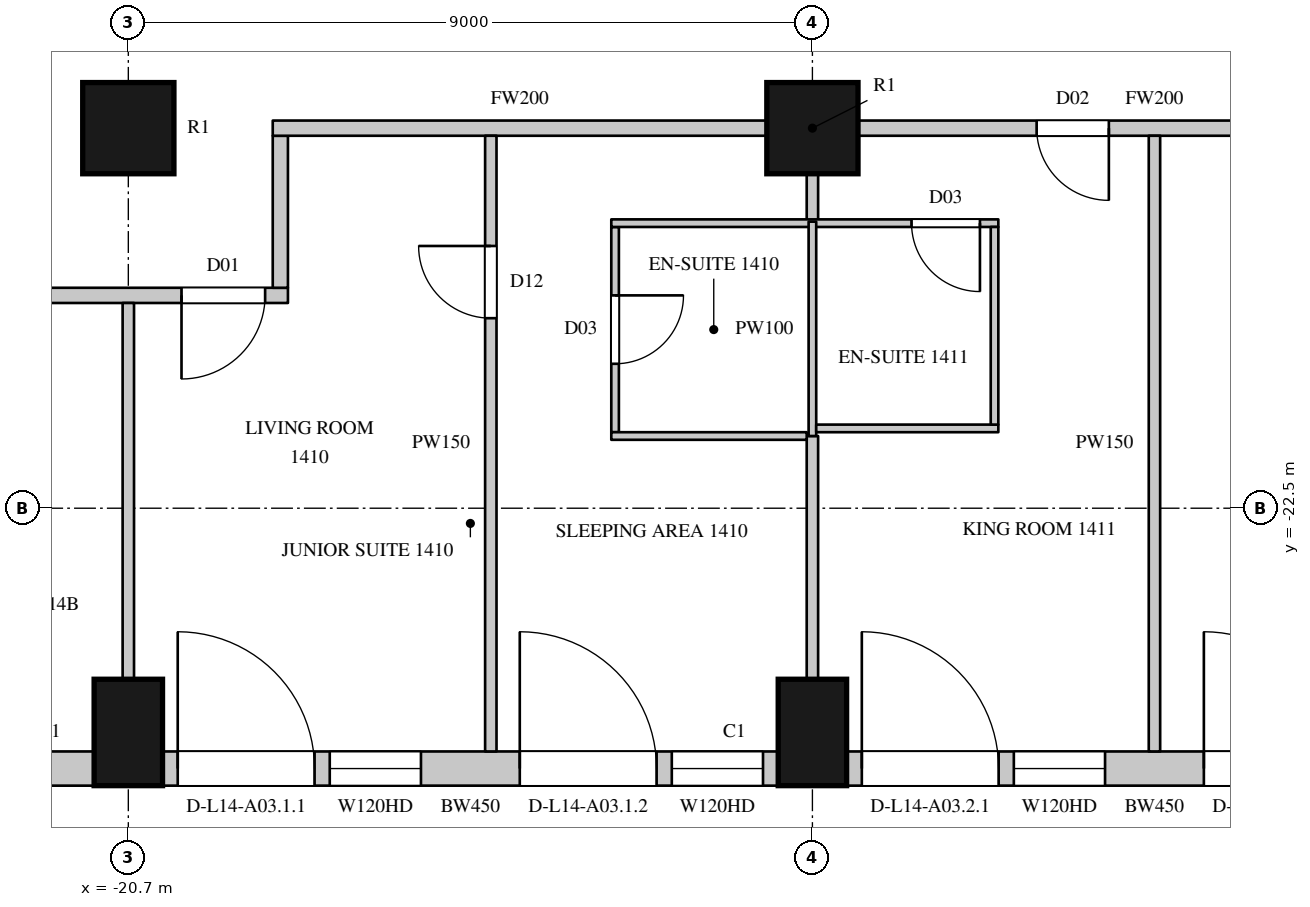
"""IFC4 building model, lengths in metres.
Left out: names, types, materials, properties, quantities, classifications, styles, units other than length and angle.
Written with IfcOpenShell. Run it as: python <this file> out.ifc"""

import sys

from ifc_helpers import new_model, si_unit, direction, frame, frame_2d, origin, origin_2d, place, context, subcontext, project, spatial, rectangle, circle, extrude, element, fill, save


model = new_model("IFC4")
c1 = context("Model", 3, precision=1e-05, world=origin(), true_north=direction((0.0, 1.0)))
c2 = subcontext(c1, "Body", "Model", "MODEL_VIEW")
j1 = project(units=[si_unit("LENGTHUNIT", "METRE"), si_unit("PLANEANGLEUNIT", "RADIAN")], contexts=[c1])
p1 = place(None, origin())
s1 = spatial("IfcSite", under=j1, at=p1, CompositionType="ELEMENT")
p2 = place(p1, origin())
s2 = spatial("IfcBuilding", under=s1, at=p2, CompositionType="ELEMENT")
p3 = place(p2, frame((0.0, 0.0, 80.7)))
s3 = spatial("IfcBuildingStorey", under=s2, at=p3, CompositionType="ELEMENT", Elevation=80.7)
for number, where, z_axis, x_axis in (
    (1, (-20.7, -25.45, 0.0), (0.0, 0.0, 1.0), (1.0, 0.0, 0.0)),
    (2, (-11.7, -25.45, 0.0), (0.0, 0.0, 1.0), (1.0, 0.0, 0.0)),
):
    element("IfcColumn", number, at=place(p3, frame(where, z_axis=z_axis, x_axis=x_axis)), inside=s3, PredefinedType="COLUMN", context=c2, shape_type="SweptSolid", body=[
        extrude(rectangle(XDim=0.9, YDim=1.4, at=origin_2d()), origin(), (0.0, 0.0, 1.0), 3.6),
    ])
for number, where, z_axis, x_axis in (
    (3, (-20.7, -17.5, 0.0), (0.0, 0.0, 1.0), (1.0, 0.0, 0.0)),
    (4, (-11.7, -17.5, 0.0), (0.0, 0.0, 1.0), (1.0, 0.0, 0.0)),
):
    element("IfcColumn", number, at=place(p3, frame(where, z_axis=z_axis, x_axis=x_axis)), inside=s3, PredefinedType="COLUMN", context=c2, shape_type="SweptSolid", body=[
        extrude(circle(Radius=0.6, at=origin_2d()), origin(), (0.0, 0.0, 1.0), 3.6),
    ])
p4 = place(p3, frame((-24.064, -25.925, 0.0), z_axis=(0.0, 0.0, 1.0), x_axis=(1.0, 0.0, 0.0)))
e5 = element("IfcWall", 5, at=p4, inside=s3, PredefinedType="SOLIDWALL", context=c2, shape_type="SweptSolid", body=[
    extrude(rectangle(XDim=2.914, YDim=0.45, at=frame_2d((1.457, 0.0))), origin(), (0.0, 0.0, 1.0), 3.3),
])
p5 = place(p3, frame((-20.25, -25.925, 0.0), z_axis=(0.0, 0.0, 1.0), x_axis=(1.0, 0.0, 0.0)))
e6 = element("IfcWall", 6, at=p5, inside=s3, PredefinedType="SOLIDWALL", context=c2, shape_type="SweptSolid", body=[
    extrude(rectangle(XDim=8.1, YDim=0.45, at=frame_2d((4.05, 0.0))), origin(), (0.0, 0.0, 1.0), 3.3),
])
p6 = place(p5, frame((0.2, 0.0, 0.0)))
e7 = element("IfcOpeningElement", 7, at=p6, cuts=e6, PredefinedType="OPENING", context=c2, shape_type="SweptSolid", body=[
    extrude(rectangle(XDim=1.8, YDim=2.4, at=frame_2d((0.9, 1.2))), frame((0.0, 0.235, 0.0), z_axis=(0.0, -1.0, 0.0), x_axis=(1.0, 0.0, 0.0)), (0.0, 0.0, 1.0), 0.47),
])
p7 = place(p5, frame((2.2, 0.0, 1.05)))
e8 = element("IfcOpeningElement", 8, at=p7, cuts=e6, PredefinedType="OPENING", context=c2, shape_type="SweptSolid", body=[
    extrude(rectangle(XDim=1.2, YDim=2.0, at=frame_2d((0.6, 1.0))), frame((0.0, 0.235, 0.0), z_axis=(0.0, -1.0, 0.0), x_axis=(1.0, 0.0, 0.0)), (0.0, 0.0, 1.0), 0.47),
])
p8 = place(p5, frame((4.7, 0.0, 0.0)))
e9 = element("IfcOpeningElement", 9, at=p8, cuts=e6, PredefinedType="OPENING", context=c2, shape_type="SweptSolid", body=[
    extrude(rectangle(XDim=1.8, YDim=2.4, at=frame_2d((0.9, 1.2))), frame((0.0, 0.235, 0.0), z_axis=(0.0, -1.0, 0.0), x_axis=(1.0, 0.0, 0.0)), (0.0, 0.0, 1.0), 0.47),
])
p9 = place(p5, frame((6.7, 0.0, 1.05)))
e10 = element("IfcOpeningElement", 10, at=p9, cuts=e6, PredefinedType="OPENING", context=c2, shape_type="SweptSolid", body=[
    extrude(rectangle(XDim=1.2, YDim=2.0, at=frame_2d((0.6, 1.0))), frame((0.0, 0.235, 0.0), z_axis=(0.0, -1.0, 0.0), x_axis=(1.0, 0.0, 0.0)), (0.0, 0.0, 1.0), 0.47),
])
p10 = place(p3, frame((-11.25, -25.925, 0.0), z_axis=(0.0, 0.0, 1.0), x_axis=(1.0, 0.0, 0.0)))
e11 = element("IfcWall", 11, at=p10, inside=s3, PredefinedType="SOLIDWALL", context=c2, shape_type="SweptSolid", body=[
    extrude(rectangle(XDim=8.1, YDim=0.45, at=frame_2d((4.05, 0.0))), origin(), (0.0, 0.0, 1.0), 3.3),
])
p11 = place(p10, frame((0.2, 0.0, 0.0)))
e12 = element("IfcOpeningElement", 12, at=p11, cuts=e11, PredefinedType="OPENING", context=c2, shape_type="SweptSolid", body=[
    extrude(rectangle(XDim=1.8, YDim=2.4, at=frame_2d((0.9, 1.2))), frame((0.0, 0.235, 0.0), z_axis=(0.0, -1.0, 0.0), x_axis=(1.0, 0.0, 0.0)), (0.0, 0.0, 1.0), 0.47),
])
p12 = place(p10, frame((2.2, 0.0, 1.05)))
e13 = element("IfcOpeningElement", 13, at=p12, cuts=e11, PredefinedType="OPENING", context=c2, shape_type="SweptSolid", body=[
    extrude(rectangle(XDim=1.2, YDim=2.0, at=frame_2d((0.6, 1.0))), frame((0.0, 0.235, 0.0), z_axis=(0.0, -1.0, 0.0), x_axis=(1.0, 0.0, 0.0)), (0.0, 0.0, 1.0), 0.47),
])
p13 = place(p10, frame((4.7, 0.0, 0.0)))
e14 = element("IfcOpeningElement", 14, at=p13, cuts=e11, PredefinedType="OPENING", context=c2, shape_type="SweptSolid", body=[
    extrude(rectangle(XDim=1.8, YDim=2.4, at=frame_2d((0.9, 1.2))), frame((0.0, 0.235, 0.0), z_axis=(0.0, -1.0, 0.0), x_axis=(1.0, 0.0, 0.0)), (0.0, 0.0, 1.0), 0.47),
])
p14 = place(p10, frame((6.7, 0.0, 1.05)))
e15 = element("IfcOpeningElement", 15, at=p14, cuts=e11, PredefinedType="OPENING", context=c2, shape_type="SweptSolid", body=[
    extrude(rectangle(XDim=1.2, YDim=2.0, at=frame_2d((0.6, 1.0))), frame((0.0, 0.235, 0.0), z_axis=(0.0, -1.0, 0.0), x_axis=(1.0, 0.0, 0.0)), (0.0, 0.0, 1.0), 0.47),
])
p15 = place(p3, frame((-23.7, -19.7, 0.0), z_axis=(0.0, 0.0, 1.0), x_axis=(1.0, 0.0, 0.0)))
e16 = element("IfcWall", 16, at=p15, inside=s3, PredefinedType="PARTITIONING", context=c2, shape_type="SweptSolid", body=[
    extrude(rectangle(XDim=5.1, YDim=0.2, at=frame_2d((2.55, 0.0))), origin(), (0.0, 0.0, 1.0), 3.3),
])
p16 = place(p15, frame((0.8, 0.0, 0.0)))
e17 = element("IfcOpeningElement", 17, at=p16, cuts=e16, PredefinedType="OPENING", context=c2, shape_type="SweptSolid", body=[
    extrude(rectangle(XDim=0.9, YDim=2.2, at=frame_2d((0.45, 1.1))), frame((0.0, 0.11, 0.0), z_axis=(0.0, -1.0, 0.0), x_axis=(1.0, 0.0, 0.0)), (0.0, 0.0, 1.0), 0.22),
])
p17 = place(p15, frame((3.7, 0.0, 0.0)))
e18 = element("IfcOpeningElement", 18, at=p17, cuts=e16, PredefinedType="OPENING", context=c2, shape_type="SweptSolid", body=[
    extrude(rectangle(XDim=1.1, YDim=2.4, at=frame_2d((0.55, 1.2))), frame((0.0, 0.11, 0.0), z_axis=(0.0, -1.0, 0.0), x_axis=(1.0, 0.0, 0.0)), (0.0, 0.0, 1.0), 0.22),
])
p18 = place(p3, frame((-18.7, -19.6, 0.0), z_axis=(0.0, 0.0, 1.0), x_axis=(0.0, 1.0, 0.0)))
e19 = element("IfcWall", 19, at=p18, inside=s3, PredefinedType="PARTITIONING", context=c2, shape_type="SweptSolid", body=[
    extrude(rectangle(XDim=2.0, YDim=0.2, at=frame_2d((1.0, 0.0))), origin(), (0.0, 0.0, 1.0), 3.3),
])
p19 = place(p3, frame((-18.8, -17.5, 0.0), z_axis=(0.0, 0.0, 1.0), x_axis=(1.0, 0.0, 0.0)))
e20 = element("IfcWall", 20, at=p19, inside=s3, PredefinedType="PARTITIONING", context=c2, shape_type="SweptSolid", body=[
    extrude(rectangle(XDim=6.5, YDim=0.2, at=frame_2d((3.25, 0.0))), origin(), (0.0, 0.0, 1.0), 2.75),
])
p20 = place(p3, frame((-11.1, -17.5, 0.0), z_axis=(0.0, 0.0, 1.0), x_axis=(1.0, 0.0, 0.0)))
e21 = element("IfcWall", 21, at=p20, inside=s3, PredefinedType="PARTITIONING", context=c2, shape_type="SweptSolid", body=[
    extrude(rectangle(XDim=7.8, YDim=0.2, at=frame_2d((3.9, 0.0))), origin(), (0.0, 0.0, 1.0), 2.75),
])
p21 = place(p20, frame((2.35, 0.0, 0.0)))
e22 = element("IfcOpeningElement", 22, at=p21, cuts=e21, PredefinedType="OPENING", context=c2, shape_type="SweptSolid", body=[
    extrude(rectangle(XDim=0.95, YDim=2.2, at=frame_2d((0.475, 1.1))), frame((0.0, 0.11, 0.0), z_axis=(0.0, -1.0, 0.0), x_axis=(1.0, 0.0, 0.0)), (0.0, 0.0, 1.0), 0.22),
])
p22 = place(p20, frame((5.15, 0.0, 0.0)))
e23 = element("IfcOpeningElement", 23, at=p22, cuts=e21, PredefinedType="OPENING", context=c2, shape_type="SweptSolid", body=[
    extrude(rectangle(XDim=1.1, YDim=2.4, at=frame_2d((0.55, 1.2))), frame((0.0, 0.11, 0.0), z_axis=(0.0, -1.0, 0.0), x_axis=(1.0, 0.0, 0.0)), (0.0, 0.0, 1.0), 0.22),
])
p23 = place(p3, frame((-20.7, -24.75, 0.0), z_axis=(0.0, 0.0, 1.0), x_axis=(0.0, 1.0, 0.0)))
e24 = element("IfcWall", 24, at=p23, inside=s3, PredefinedType="PARTITIONING", context=c2, shape_type="SweptSolid", body=[
    extrude(rectangle(XDim=4.95, YDim=0.15, at=frame_2d((2.475, 0.0))), origin(), (0.0, 0.0, 1.0), 2.75),
])
p24 = place(p3, frame((-15.931, -25.7, 0.0), z_axis=(0.0, 0.0, 1.0), x_axis=(0.0, 1.0, 0.0)))
e25 = element("IfcWall", 25, at=p24, inside=s3, PredefinedType="PARTITIONING", context=c2, shape_type="SweptSolid", body=[
    extrude(rectangle(XDim=8.1, YDim=0.15, at=frame_2d((4.05, 0.0))), origin(), (0.0, 0.0, 1.0), 3.3),
])
p25 = place(p24, frame((5.7, 0.0, 0.0)))
e26 = element("IfcOpeningElement", 26, at=p25, cuts=e25, PredefinedType="OPENING", context=c2, shape_type="SweptSolid", body=[
    extrude(rectangle(XDim=0.95, YDim=2.2, at=frame_2d((0.475, 1.1))), frame((0.0, 0.085, 0.0), z_axis=(0.0, -1.0, 0.0), x_axis=(1.0, 0.0, 0.0)), (0.0, 0.0, 1.0), 0.17),
])
p26 = place(p3, frame((-11.7, -24.75, 0.0), z_axis=(0.0, 0.0, 1.0), x_axis=(0.0, 1.0, 0.0)))
e27 = element("IfcWall", 27, at=p26, inside=s3, PredefinedType="PARTITIONING", context=c2, shape_type="SweptSolid", body=[
    extrude(rectangle(XDim=3.2, YDim=0.15, at=frame_2d((1.6, 0.0))), origin(), (0.0, 0.0, 1.0), 2.75),
])
p27 = place(p3, frame((-11.7, -18.73, 0.0), z_axis=(0.0, 0.0, 1.0), x_axis=(0.0, 1.0, 0.0)))
e28 = element("IfcWall", 28, at=p27, inside=s3, PredefinedType="PARTITIONING", context=c2, shape_type="SweptSolid", body=[
    extrude(rectangle(XDim=0.63, YDim=0.15, at=frame_2d((0.315, 0.0))), origin(), (0.0, 0.0, 1.0), 2.75),
])
p28 = place(p3, frame((-7.2, -25.7, 0.0), z_axis=(0.0, 0.0, 1.0), x_axis=(0.0, 1.0, 0.0)))
e29 = element("IfcWall", 29, at=p28, inside=s3, PredefinedType="PARTITIONING", context=c2, shape_type="SweptSolid", body=[
    extrude(rectangle(XDim=8.1, YDim=0.15, at=frame_2d((4.05, 0.0))), origin(), (0.0, 0.0, 1.0), 2.65),
])
p29 = place(p3, frame((-14.296, -21.5, 0.0), z_axis=(0.0, 0.0, 1.0), x_axis=(0.0, 1.0, 0.0)))
e30 = element("IfcWall", 30, at=p29, inside=s3, PredefinedType="PARTITIONING", context=c2, shape_type="SweptSolid", body=[
    extrude(rectangle(XDim=2.7, YDim=0.1, at=frame_2d((1.35, 0.0))), origin(), (0.0, 0.0, 1.0), 3.3),
])
p30 = place(p29, frame((0.9, 0.0, 0.0)))
e31 = element("IfcOpeningElement", 31, at=p30, cuts=e30, PredefinedType="OPENING", context=c2, shape_type="SweptSolid", body=[
    extrude(rectangle(XDim=0.9, YDim=2.2, at=frame_2d((0.45, 1.1))), frame((0.0, 0.06, 0.0), z_axis=(0.0, -1.0, 0.0), x_axis=(1.0, 0.0, 0.0)), (0.0, 0.0, 1.0), 0.12),
])
p31 = place(p3, frame((-14.346, -21.55, 0.0), z_axis=(0.0, 0.0, 1.0), x_axis=(1.0, 0.0, 0.0)))
e32 = element("IfcWall", 32, at=p31, inside=s3, PredefinedType="PARTITIONING", context=c2, shape_type="SweptSolid", body=[
    extrude(rectangle(XDim=2.571, YDim=0.1, at=frame_2d((1.286, 0.0))), origin(), (0.0, 0.0, 1.0), 3.3),
])
p32 = place(p3, frame((-14.346, -18.75, 0.0), z_axis=(0.0, 0.0, 1.0), x_axis=(1.0, 0.0, 0.0)))
e33 = element("IfcWall", 33, at=p32, inside=s3, PredefinedType="PARTITIONING", context=c2, shape_type="SweptSolid", body=[
    extrude(rectangle(XDim=5.092, YDim=0.1, at=frame_2d((2.546, 0.0))), origin(), (0.0, 0.0, 1.0), 3.3),
])
p33 = place(p32, frame((3.95, 0.0, 0.0)))
e34 = element("IfcOpeningElement", 34, at=p33, cuts=e33, PredefinedType="OPENING", context=c2, shape_type="SweptSolid", body=[
    extrude(rectangle(XDim=0.9, YDim=2.2, at=frame_2d((0.45, 1.1))), frame((0.0, 0.06, 0.0), z_axis=(0.0, -1.0, 0.0), x_axis=(1.0, 0.0, 0.0)), (0.0, 0.0, 1.0), 0.12),
])
p34 = place(p3, frame((-11.7, -21.55, 0.0), z_axis=(0.0, 0.0, 1.0), x_axis=(0.0, 1.0, 0.0)))
e35 = element("IfcWall", 35, at=p34, inside=s3, PredefinedType="PARTITIONING", context=c2, shape_type="SweptSolid", body=[
    extrude(rectangle(XDim=2.82, YDim=0.1, at=frame_2d((1.41, 0.0))), origin(), (0.0, 0.0, 1.0), 2.75),
])
p35 = place(p3, frame((-11.65, -21.45, 0.0), z_axis=(0.0, 0.0, 1.0), x_axis=(1.0, 0.0, 0.0)))
e36 = element("IfcWall", 36, at=p35, inside=s3, PredefinedType="PARTITIONING", context=c2, shape_type="SweptSolid", body=[
    extrude(rectangle(XDim=2.396, YDim=0.1, at=frame_2d((1.198, 0.0))), origin(), (0.0, 0.0, 1.0), 3.3),
])
p36 = place(p3, frame((-9.304, -21.4, 0.0), z_axis=(0.0, 0.0, 1.0), x_axis=(0.0, 1.0, 0.0)))
e37 = element("IfcWall", 37, at=p36, inside=s3, PredefinedType="PARTITIONING", context=c2, shape_type="SweptSolid", body=[
    extrude(rectangle(XDim=2.6, YDim=0.1, at=frame_2d((1.3, 0.0))), origin(), (0.0, 0.0, 1.0), 3.3),
])
p37 = place(p6, origin())
e38 = element("IfcDoor", 38, at=p37, inside=s3, OperationType="SLIDING_TO_LEFT", PredefinedType="DOOR", context=c2, shape_type="SweptSolid", body=[
    extrude(rectangle(XDim=1.8, YDim=2.4, at=frame_2d((0.9, 1.2))), frame((0.0, 0.13, 0.0), z_axis=(0.0, -1.0, 0.0), x_axis=(1.0, 0.0, 0.0)), (0.0, 0.0, 1.0), 0.05),
])
fill(e7, e38)
p38 = place(p7, origin())
e39 = element("IfcWindow", 39, at=p38, inside=s3, PartitioningType="SINGLE_PANEL", PredefinedType="WINDOW", context=c2, shape_type="SweptSolid", body=[
    extrude(rectangle(XDim=1.2, YDim=2.0, at=frame_2d((0.6, 1.0))), frame((0.0, 0.135, 0.0), z_axis=(0.0, -1.0, 0.0), x_axis=(1.0, 0.0, 0.0)), (0.0, 0.0, 1.0), 0.06),
])
fill(e8, e39)
p39 = place(p8, origin())
e40 = element("IfcDoor", 40, at=p39, inside=s3, OperationType="SLIDING_TO_LEFT", PredefinedType="DOOR", context=c2, shape_type="SweptSolid", body=[
    extrude(rectangle(XDim=1.8, YDim=2.4, at=frame_2d((0.9, 1.2))), frame((0.0, 0.13, 0.0), z_axis=(0.0, -1.0, 0.0), x_axis=(1.0, 0.0, 0.0)), (0.0, 0.0, 1.0), 0.05),
])
fill(e9, e40)
p40 = place(p9, origin())
e41 = element("IfcWindow", 41, at=p40, inside=s3, PartitioningType="SINGLE_PANEL", PredefinedType="WINDOW", context=c2, shape_type="SweptSolid", body=[
    extrude(rectangle(XDim=1.2, YDim=2.0, at=frame_2d((0.6, 1.0))), frame((0.0, 0.135, 0.0), z_axis=(0.0, -1.0, 0.0), x_axis=(1.0, 0.0, 0.0)), (0.0, 0.0, 1.0), 0.06),
])
fill(e10, e41)
p41 = place(p11, origin())
e42 = element("IfcDoor", 42, at=p41, inside=s3, OperationType="SLIDING_TO_LEFT", PredefinedType="DOOR", context=c2, shape_type="SweptSolid", body=[
    extrude(rectangle(XDim=1.8, YDim=2.4, at=frame_2d((0.9, 1.2))), frame((0.0, 0.13, 0.0), z_axis=(0.0, -1.0, 0.0), x_axis=(1.0, 0.0, 0.0)), (0.0, 0.0, 1.0), 0.05),
])
fill(e12, e42)
p42 = place(p12, origin())
e43 = element("IfcWindow", 43, at=p42, inside=s3, PartitioningType="SINGLE_PANEL", PredefinedType="WINDOW", context=c2, shape_type="SweptSolid", body=[
    extrude(rectangle(XDim=1.2, YDim=2.0, at=frame_2d((0.6, 1.0))), frame((0.0, 0.135, 0.0), z_axis=(0.0, -1.0, 0.0), x_axis=(1.0, 0.0, 0.0)), (0.0, 0.0, 1.0), 0.06),
])
fill(e13, e43)
p43 = place(p13, origin())
e44 = element("IfcDoor", 44, at=p43, inside=s3, OperationType="SLIDING_TO_LEFT", PredefinedType="DOOR", context=c2, shape_type="SweptSolid", body=[
    extrude(rectangle(XDim=1.8, YDim=2.4, at=frame_2d((0.9, 1.2))), frame((0.0, 0.13, 0.0), z_axis=(0.0, -1.0, 0.0), x_axis=(1.0, 0.0, 0.0)), (0.0, 0.0, 1.0), 0.05),
])
fill(e14, e44)
p44 = place(p17, origin())
e45 = element("IfcDoor", 45, at=p44, inside=s3, OperationType="SINGLE_SWING_RIGHT", PredefinedType="DOOR", context=c2, shape_type="SweptSolid", body=[
    extrude(rectangle(XDim=1.1, YDim=2.4, at=frame_2d((0.55, 1.2))), frame((0.0, 0.025, 0.0), z_axis=(0.0, -1.0, 0.0), x_axis=(1.0, 0.0, 0.0)), (0.0, 0.0, 1.0), 0.05),
])
fill(e18, e45)
p45 = place(p25, origin())
e46 = element("IfcDoor", 46, at=p45, inside=s3, OperationType="SINGLE_SWING_RIGHT", PredefinedType="DOOR", context=c2, shape_type="SweptSolid", body=[
    extrude(rectangle(XDim=0.95, YDim=2.2, at=frame_2d((0.475, 1.1))), frame((0.0, 0.025, 0.0), z_axis=(0.0, -1.0, 0.0), x_axis=(1.0, 0.0, 0.0)), (0.0, 0.0, 1.0), 0.05),
])
fill(e26, e46)
p46 = place(p30, origin())
e47 = element("IfcDoor", 47, at=p46, inside=s3, OperationType="SINGLE_SWING_LEFT", PredefinedType="DOOR", context=c2, shape_type="SweptSolid", body=[
    extrude(rectangle(XDim=0.9, YDim=2.2, at=frame_2d((0.45, 1.1))), frame((0.0, 0.025, 0.0), z_axis=(0.0, -1.0, 0.0), x_axis=(1.0, 0.0, 0.0)), (0.0, 0.0, 1.0), 0.05),
])
fill(e31, e47)
p47 = place(p21, origin())
e48 = element("IfcDoor", 48, at=p47, inside=s3, OperationType="SINGLE_SWING_LEFT", PredefinedType="DOOR", context=c2, shape_type="SweptSolid", body=[
    extrude(rectangle(XDim=0.95, YDim=2.2, at=frame_2d((0.475, 1.1))), frame((0.0, 0.025, 0.0), z_axis=(0.0, -1.0, 0.0), x_axis=(1.0, 0.0, 0.0)), (0.0, 0.0, 1.0), 0.05),
])
fill(e22, e48)
p48 = place(p33, origin())
e49 = element("IfcDoor", 49, at=p48, inside=s3, OperationType="SINGLE_SWING_LEFT", PredefinedType="DOOR", context=c2, shape_type="SweptSolid", body=[
    extrude(rectangle(XDim=0.9, YDim=2.2, at=frame_2d((0.45, 1.1))), frame((0.0, 0.025, 0.0), z_axis=(0.0, -1.0, 0.0), x_axis=(1.0, 0.0, 0.0)), (0.0, 0.0, 1.0), 0.05),
])
fill(e34, e49)
save(model, sys.argv[1])
